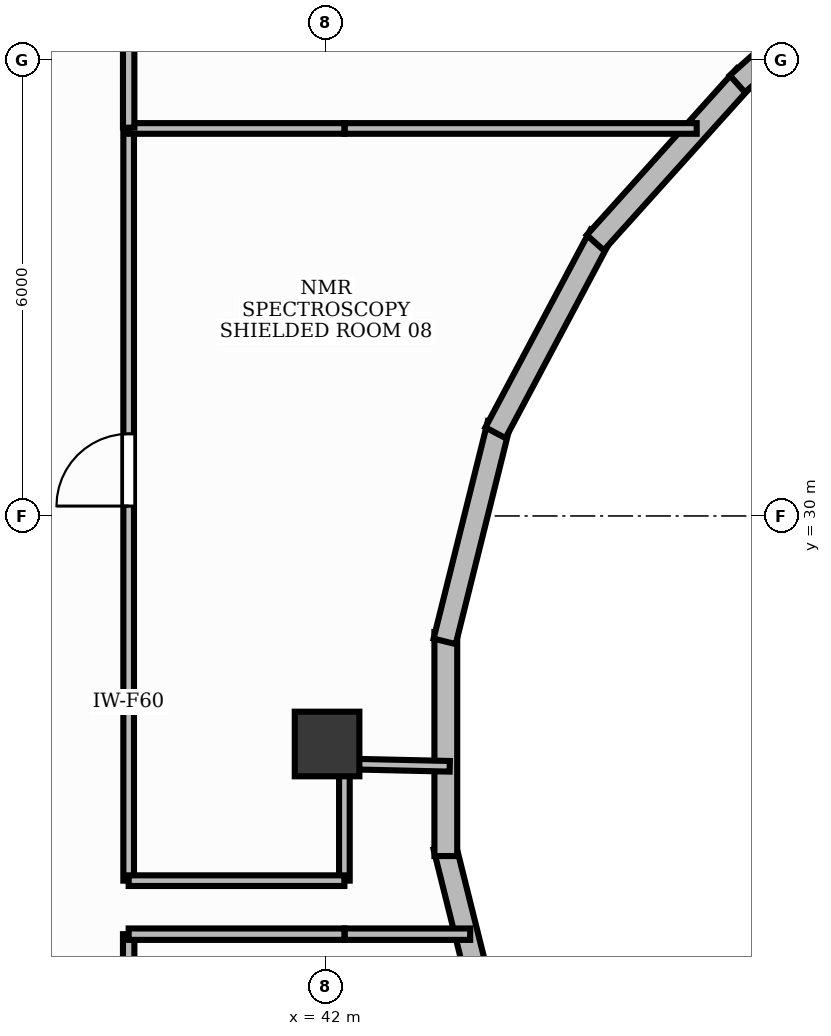
"""IFC4 building model, lengths in metres.
Left out: names, types, materials, properties, quantities, classifications, styles, units other than length and angle.
Written with IfcOpenShell. Run it as: python <this file> out.ifc"""

import sys

from ifc_helpers import new_model, si_unit, direction, frame, frame_2d, origin, origin_2d, place, context, subcontext, project, spatial, rectangle, extrude, element, fill, save


model = new_model("IFC4")
c1 = context("Model", 3, precision=1e-05, world=origin(), true_north=direction((0.0, 1.0)))
c2 = subcontext(c1, "Body", "Model", "MODEL_VIEW")
j1 = project(units=[si_unit("LENGTHUNIT", "METRE"), si_unit("PLANEANGLEUNIT", "RADIAN")], contexts=[c1])
p1 = place(None, origin())
s1 = spatial("IfcSite", under=j1, at=p1, CompositionType="ELEMENT")
p2 = place(p1, origin())
s2 = spatial("IfcBuilding", under=s1, at=p2, CompositionType="ELEMENT")
p3 = place(p2, frame((0.0, 0.0, 282.6)))
s3 = spatial("IfcBuildingStorey", under=s2, at=p3, CompositionType="ELEMENT", Elevation=282.6)
p4 = place(p3, frame((42.02, 27.0, -0.0), z_axis=(0.0, 0.0, 1.0), x_axis=(0.0, 1.0, 0.0)))
e1 = element("IfcColumn", 1, at=p4, inside=s3, PredefinedType="COLUMN", context=c2, shape_type="SweptSolid", body=[
    extrude(rectangle(XDim=0.85, YDim=0.85, at=origin_2d()), origin(), (0.0, 0.0, 1.0), 3.791),
])
p5 = place(p3, frame((44.281, 22.789, 0.0), z_axis=(0.0, 0.0, 1.0), x_axis=(-0.24195108751, 0.970288447449, 0.0)))
e2 = element("IfcWall", 2, at=p5, inside=s3, PredefinedType="STANDARD", context=c2, shape_type="SweptSolid", body=[
    extrude(rectangle(XDim=2.948, YDim=0.3, at=frame_2d((1.474, 0.0))), origin(), (0.0, 0.0, 1.0), 3.79),
])
p6 = place(p3, frame((43.583, 25.526, 0.0), z_axis=(0.0, 0.0, 1.0), x_axis=(0.0, 1.0, 0.0)))
e3 = element("IfcWall", 3, at=p6, inside=s3, PredefinedType="STANDARD", context=c2, shape_type="SweptSolid", body=[
    extrude(rectangle(XDim=2.948, YDim=0.3, at=frame_2d((1.474, 0.0))), origin(), (0.0, 0.0, 1.0), 3.79),
])
p7 = place(p3, frame((43.567, 28.35, 0.0), z_axis=(0.0, 0.0, 1.0), x_axis=(0.24195108751, 0.970288447449, 0.0)))
e4 = element("IfcWall", 4, at=p7, inside=s3, PredefinedType="STANDARD", context=c2, shape_type="SweptSolid", body=[
    extrude(rectangle(XDim=2.948, YDim=0.3, at=frame_2d((1.474, 0.0))), origin(), (0.0, 0.0, 1.0), 3.79),
])
p8 = place(p3, frame((44.236, 31.095, 0.0), z_axis=(0.0, 0.0, 1.0), x_axis=(0.469466013123, 0.882950543644, 0.0)))
e5 = element("IfcWall", 5, at=p8, inside=s3, PredefinedType="STANDARD", context=c2, shape_type="SweptSolid", body=[
    extrude(rectangle(XDim=2.948, YDim=0.3, at=frame_2d((1.474, 0.0))), origin(), (0.0, 0.0, 1.0), 3.79),
])
p9 = place(p3, frame((45.548, 33.596, 0.0), z_axis=(0.0, 0.0, 1.0), x_axis=(0.669166006669, 0.743112949368, 0.0)))
e6 = element("IfcWall", 6, at=p9, inside=s3, PredefinedType="STANDARD", context=c2, shape_type="SweptSolid", body=[
    extrude(rectangle(XDim=2.948, YDim=0.3, at=frame_2d((1.474, 0.0))), origin(), (0.0, 0.0, 1.0), 3.79),
])
p10 = place(p3, frame((47.419, 35.684, 0.0), z_axis=(0.0, 0.0, 1.0), x_axis=(0.744720921046, 0.667376018266, 0.0)))
e7 = element("IfcWall", 7, at=p10, inside=s3, PredefinedType="STANDARD", context=c2, shape_type="SweptSolid", body=[
    extrude(rectangle(XDim=3.094, YDim=0.3, at=frame_2d((1.547, 0.0))), origin(), (0.0, 0.0, 1.0), 3.79),
])
p11 = place(p3, frame((39.41, 22.308, 0.0), z_axis=(0.0, 0.0, 1.0), x_axis=(0.0, 1.0, 0.0)))
e8 = element("IfcWall", 8, at=p11, inside=s3, PredefinedType="PARTITIONING", context=c2, shape_type="SweptSolid", body=[
    extrude(rectangle(XDim=2.19, YDim=0.15, at=frame_2d((1.095, 0.0))), origin(), (0.0, 0.0, 1.0), 2.8),
])
p12 = place(p11, frame((0.24, 0.0, 0.0)))
e9 = element("IfcOpeningElement", 9, at=p12, cuts=e8, PredefinedType="OPENING", context=c2, shape_type="SweptSolid", body=[
    extrude(rectangle(XDim=0.95, YDim=2.15, at=frame_2d((0.475, 1.075))), frame((0.0, 0.09, 0.0), z_axis=(0.0, -1.0, 0.0), x_axis=(1.0, 0.0, 0.0)), (0.0, 0.0, 1.0), 0.18),
])
p13 = place(p3, frame((39.41, 25.202, 0.0), z_axis=(0.0, 0.0, 1.0), x_axis=(0.0, 1.0, 0.0)))
e10 = element("IfcWall", 10, at=p13, inside=s3, PredefinedType="PARTITIONING", context=c2, shape_type="SweptSolid", body=[
    extrude(rectangle(XDim=9.896, YDim=0.14, at=frame_2d((4.948, 0.0))), origin(), (0.0, 0.0, 1.0), 2.8),
])
p14 = place(p13, frame((4.928, 0.0, 0.0)))
e11 = element("IfcOpeningElement", 11, at=p14, cuts=e10, PredefinedType="OPENING", context=c2, shape_type="SweptSolid", body=[
    extrude(rectangle(XDim=0.95, YDim=2.15, at=frame_2d((0.475, 1.075))), frame((0.0, 0.085, 0.0), z_axis=(0.0, -1.0, 0.0), x_axis=(1.0, 0.0, 0.0)), (0.0, 0.0, 1.0), 0.17),
])
p15 = place(p3, frame((42.252, 24.498, 0.0), z_axis=(0.0, 0.0, 1.0), x_axis=(1.0, 0.0, 0.0)))
e12 = element("IfcWall", 12, at=p15, inside=s3, PredefinedType="PARTITIONING", context=c2, shape_type="SweptSolid", body=[
    extrude(rectangle(XDim=1.651, YDim=0.15, at=frame_2d((0.825, 0.0))), origin(), (0.0, 0.0, 1.0), 2.8),
])
p16 = place(p3, frame((39.41, 24.498, 0.0), z_axis=(0.0, 0.0, 1.0), x_axis=(1.0, 0.0, 0.0)))
e13 = element("IfcWall", 13, at=p16, inside=s3, PredefinedType="PARTITIONING", context=c2, shape_type="SweptSolid", body=[
    extrude(rectangle(XDim=2.838, YDim=0.15, at=frame_2d((1.419, 0.0))), origin(), (0.0, 0.0, 1.0), 2.8),
])
p17 = place(p3, frame((42.252, 35.098, 0.0), z_axis=(0.0, 0.0, 1.0), x_axis=(1.0, 0.0, 0.0)))
e14 = element("IfcWall", 14, at=p17, inside=s3, PredefinedType="PARTITIONING", context=c2, shape_type="SweptSolid", body=[
    extrude(rectangle(XDim=4.631, YDim=0.14, at=frame_2d((2.315, 0.0))), origin(), (0.0, 0.0, 1.0), 2.8),
])
p18 = place(p3, frame((43.634, 26.707, 0.0), z_axis=(0.0, 0.0, 1.0), x_axis=(-0.999744382527, 0.022609060241, 0.0)))
e15 = element("IfcWall", 15, at=p18, inside=s3, PredefinedType="PARTITIONING", context=c2, shape_type="SweptSolid", body=[
    extrude(rectangle(XDim=1.382, YDim=0.14, at=frame_2d((0.691, 0.0))), origin(), (0.0, 0.0, 1.0), 2.8),
])
p19 = place(p3, frame((42.248, 26.734, 0.0), z_axis=(0.0, 0.0, 1.0), x_axis=(0.0, -1.0, 0.0)))
e16 = element("IfcWall", 16, at=p19, inside=s3, PredefinedType="PARTITIONING", context=c2, shape_type="SweptSolid", body=[
    extrude(rectangle(XDim=1.532, YDim=0.14, at=frame_2d((0.766, 0.0))), origin(), (0.0, 0.0, 1.0), 2.8),
])
for number, where, z_axis, x_axis in (
    (17, (42.248, 25.202, 0.0), (0.0, 0.0, 1.0), (-1.0, 0.0, 0.0)),
    (18, (39.41, 35.098, 0.0), (0.0, 0.0, 1.0), (1.0, 0.0, 0.0)),
):
    element("IfcWall", number, at=place(p3, frame(where, z_axis=z_axis, x_axis=x_axis)), inside=s3, PredefinedType="PARTITIONING", context=c2, shape_type="SweptSolid", body=[
        extrude(rectangle(XDim=2.838, YDim=0.14, at=frame_2d((1.419, 0.0))), origin(), (0.0, 0.0, 1.0), 2.8),
    ])
p20 = place(p3, frame((39.41, 35.108, 0.0), z_axis=(0.0, 0.0, 1.0), x_axis=(0.0, 1.0, 0.0)))
e19 = element("IfcWall", 19, at=p20, inside=s3, PredefinedType="PARTITIONING", context=c2, shape_type="SweptSolid", body=[
    extrude(rectangle(XDim=5.642, YDim=0.15, at=frame_2d((2.821, 0.0))), origin(), (0.0, 0.0, 1.0), 2.8),
])
p21 = place(p14, origin())
e20 = element("IfcDoor", 20, at=p21, inside=s3, OperationType="SINGLE_SWING_LEFT", PredefinedType="DOOR", context=c2, shape_type="SweptSolid", body=[
    extrude(rectangle(XDim=0.95, YDim=2.15, at=frame_2d((0.475, 1.075))), frame((0.0, 0.025, 0.0), z_axis=(0.0, -1.0, 0.0), x_axis=(1.0, 0.0, 0.0)), (0.0, 0.0, 1.0), 0.05),
])
fill(e11, e20)
save(model, sys.argv[1])
